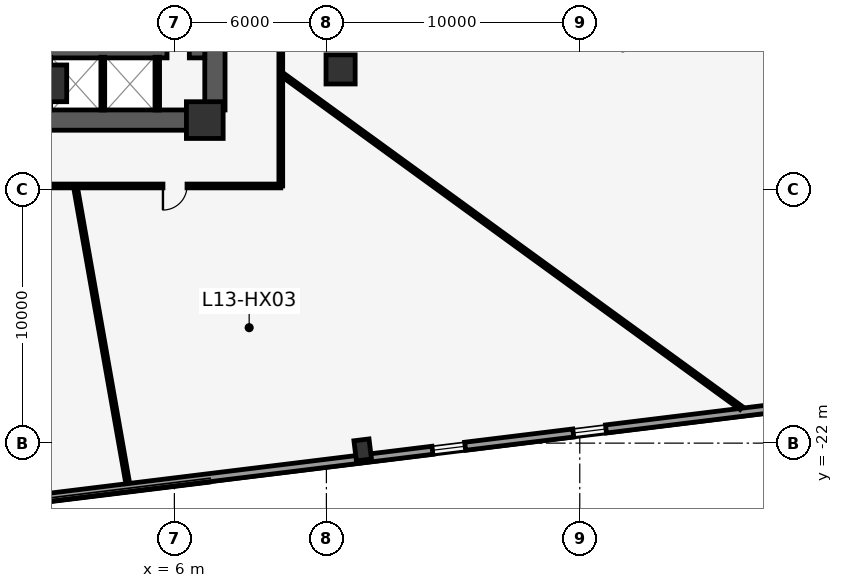
"""IFC4 building model, lengths in metres.
Left out: names, types, materials, properties, quantities, classifications, styles, units other than length and angle.
Written with IfcOpenShell. Run it as: python <this file> out.ifc"""

import sys

from ifc_helpers import new_model, si_unit, direction, frame, frame_2d, origin, origin_2d, place, context, subcontext, project, spatial, rectangle, hollow_rectangle, extrude, element, fill, save


model = new_model("IFC4")
c1 = context("Model", 3, precision=1e-05, world=origin(), true_north=direction((0.0, 1.0)))
c2 = subcontext(c1, "Body", "Model", "MODEL_VIEW")
j1 = project(units=[si_unit("LENGTHUNIT", "METRE"), si_unit("PLANEANGLEUNIT", "RADIAN")], contexts=[c1])
p1 = place(None, origin())
s1 = spatial("IfcSite", under=j1, at=p1, CompositionType="ELEMENT")
p2 = place(p1, origin())
s2 = spatial("IfcBuilding", under=s1, at=p2, CompositionType="ELEMENT")
p3 = place(p2, frame((0.0, 0.0, 62.4)))
s3 = spatial("IfcBuildingStorey", under=s2, at=p3, CompositionType="ELEMENT", Elevation=62.4)
p4 = place(p3, frame((7.6, -8.85, 0.0), z_axis=(0.0, 0.0, 1.0), x_axis=(0.0, 1.0, 0.0)))
e1 = element("IfcWall", 1, at=p4, inside=s3, PredefinedType="SHEAR", context=c2, shape_type="SweptSolid", body=[
    extrude(rectangle(XDim=8.95, YDim=0.8, at=frame_2d((4.475, 0.0))), origin(), (0.0, 0.0, 1.0), 4.35),
])
p5 = place(p4, frame((2.49, 0.0, 0.0)))
e2 = element("IfcOpeningElement", 2, at=p5, cuts=e1, PredefinedType="OPENING", context=c2, shape_type="SweptSolid", body=[
    extrude(rectangle(XDim=1.8, YDim=2.2, at=frame_2d((0.9, 1.1))), frame((0.0, 0.41, 0.0), z_axis=(0.0, -1.0, 0.0), x_axis=(1.0, 0.0, 0.0)), (0.0, 0.0, 1.0), 0.82),
])
p6 = place(p4, frame((7.4, 0.0, 0.0)))
e3 = element("IfcOpeningElement", 3, at=p6, cuts=e1, PredefinedType="OPENING", context=c2, shape_type="SweptSolid", body=[
    extrude(rectangle(XDim=1.2, YDim=2.15, at=frame_2d((0.6, 1.075))), frame((0.0, 0.41, 0.0), z_axis=(0.0, -1.0, 0.0), x_axis=(1.0, 0.0, 0.0)), (0.0, 0.0, 1.0), 0.82),
])
p7 = place(p3, frame((-7.6, -9.25, 0.0), z_axis=(0.0, 0.0, 1.0), x_axis=(1.0, 0.0, 0.0)))
e4 = element("IfcWall", 4, at=p7, inside=s3, PredefinedType="SHEAR", context=c2, shape_type="SweptSolid", body=[
    extrude(rectangle(XDim=15.2, YDim=0.8, at=frame_2d((7.6, 0.0))), origin(), (0.0, 0.0, 1.0), 4.35),
])
p8 = place(p3, frame((-7.2, -6.57, 0.0), z_axis=(0.0, 0.0, 1.0), x_axis=(1.0, 0.0, 0.0)))
e5 = element("IfcWall", 5, at=p8, inside=s3, PredefinedType="SHEAR", context=c2, shape_type="SweptSolid", body=[
    extrude(rectangle(XDim=14.4, YDim=0.45, at=frame_2d((7.2, 0.0))), origin(), (0.0, 0.0, 1.0), 4.35),
])
p9 = place(p8, frame((0.5, 0.0, 0.0)))
e6 = element("IfcOpeningElement", 6, at=p9, cuts=e5, PredefinedType="OPENING", context=c2, shape_type="SweptSolid", body=[
    extrude(rectangle(XDim=1.1, YDim=2.2, at=frame_2d((0.55, 1.1))), frame((0.0, 0.235, 0.0), z_axis=(0.0, -1.0, 0.0), x_axis=(1.0, 0.0, 0.0)), (0.0, 0.0, 1.0), 0.47),
])
p10 = place(p8, frame((2.55, 0.0, 0.0)))
e7 = element("IfcOpeningElement", 7, at=p10, cuts=e5, PredefinedType="OPENING", context=c2, shape_type="SweptSolid", body=[
    extrude(rectangle(XDim=1.1, YDim=2.2, at=frame_2d((0.55, 1.1))), frame((0.0, 0.235, 0.0), z_axis=(0.0, -1.0, 0.0), x_axis=(1.0, 0.0, 0.0)), (0.0, 0.0, 1.0), 0.47),
])
p11 = place(p8, frame((4.6, 0.0, 0.0)))
e8 = element("IfcOpeningElement", 8, at=p11, cuts=e5, PredefinedType="OPENING", context=c2, shape_type="SweptSolid", body=[
    extrude(rectangle(XDim=1.1, YDim=2.2, at=frame_2d((0.55, 1.1))), frame((0.0, 0.235, 0.0), z_axis=(0.0, -1.0, 0.0), x_axis=(1.0, 0.0, 0.0)), (0.0, 0.0, 1.0), 0.47),
])
p12 = place(p8, frame((6.3, 0.0, 0.0)))
e9 = element("IfcOpeningElement", 9, at=p12, cuts=e5, PredefinedType="OPENING", context=c2, shape_type="SweptSolid", body=[
    extrude(rectangle(XDim=1.1, YDim=2.2, at=frame_2d((0.55, 1.1))), frame((0.0, 0.235, 0.0), z_axis=(0.0, -1.0, 0.0), x_axis=(1.0, 0.0, 0.0)), (0.0, 0.0, 1.0), 0.47),
])
p13 = place(p8, frame((12.91, 0.0, 0.0)))
e10 = element("IfcOpeningElement", 10, at=p13, cuts=e5, PredefinedType="OPENING", context=c2, shape_type="SweptSolid", body=[
    extrude(rectangle(XDim=0.88, YDim=2.15, at=frame_2d((0.44, 1.075))), frame((0.0, 0.235, 0.0), z_axis=(0.0, -1.0, 0.0), x_axis=(1.0, 0.0, 0.0)), (0.0, 0.0, 1.0), 0.47),
])
for number, where, z_axis, x_axis in (
    (11, (7.2, -9.25, 0.0), (0.0, 0.0, 1.0), (1.0, 0.0, 0.0)),
    (12, (1.025, -7.8, 0.0), (0.0, 0.0, 1.0), (1.0, 0.0, 0.0)),
):
    element("IfcColumn", number, at=place(p3, frame(where, z_axis=z_axis, x_axis=x_axis)), inside=s3, PredefinedType="COLUMN", context=c2, shape_type="SweptSolid", body=[
        extrude(rectangle(XDim=1.45, YDim=1.45, at=origin_2d()), origin(), (0.0, 0.0, 1.0), 4.6),
    ])
p14 = place(p3, frame((12.56, -7.25, 0.0), z_axis=(0.0, 0.0, 1.0), x_axis=(1.0, 0.0, 0.0)))
e13 = element("IfcColumn", 13, at=p14, inside=s3, PredefinedType="COLUMN", context=c2, shape_type="SweptSolid", body=[
    extrude(rectangle(XDim=1.15, YDim=1.15, at=origin_2d()), origin(), (0.0, 0.0, 1.0), 4.6),
])
p15 = place(p3, frame((13.433, -22.268, 0.0), z_axis=(0.0, 0.0, 1.0), x_axis=(0.992546151641, 0.121869343405, 0.0)))
e14 = element("IfcColumn", 14, at=p15, inside=s3, PredefinedType="COLUMN", context=c2, shape_type="SweptSolid", body=[
    extrude(hollow_rectangle(XDim=0.6, YDim=0.8, WallThickness=0.05, at=origin_2d()), origin(), (0.0, 0.0, 1.0), 4.6),
])
p16 = place(p3, frame((-0.115, 39.555, 0.0), z_axis=(0.0, 0.0, 1.0), x_axis=(0.605877389385, -0.795558036243, 0.0)))
e15 = element("IfcWall", 15, at=p16, inside=s3, PredefinedType="STANDARD", context=c2, shape_type="SweptSolid", body=[
    extrude(rectangle(XDim=64.058, YDim=0.32, at=frame_2d((32.029, 0.0))), origin(), (0.0, 0.0, 1.0), 4.35),
])
p17 = place(p16, frame((6.179, 0.0, 0.85)))
e16 = element("IfcOpeningElement", 16, at=p17, cuts=e15, PredefinedType="OPENING", context=c2, shape_type="SweptSolid", body=[
    extrude(rectangle(XDim=1.3, YDim=2.1, at=frame_2d((0.65, 1.05))), frame((0.0, 0.17, 0.0), z_axis=(0.0, -1.0, 0.0), x_axis=(1.0, 0.0, 0.0)), (0.0, 0.0, 1.0), 0.34),
])
p18 = place(p16, frame((11.779, 0.0, 0.85)))
e17 = element("IfcOpeningElement", 17, at=p18, cuts=e15, PredefinedType="OPENING", context=c2, shape_type="SweptSolid", body=[
    extrude(rectangle(XDim=1.3, YDim=2.1, at=frame_2d((0.65, 1.05))), frame((0.0, 0.17, 0.0), z_axis=(0.0, -1.0, 0.0), x_axis=(1.0, 0.0, 0.0)), (0.0, 0.0, 1.0), 0.34),
])
p19 = place(p16, frame((17.379, 0.0, 0.85)))
e18 = element("IfcOpeningElement", 18, at=p19, cuts=e15, PredefinedType="OPENING", context=c2, shape_type="SweptSolid", body=[
    extrude(rectangle(XDim=1.3, YDim=2.1, at=frame_2d((0.65, 1.05))), frame((0.0, 0.17, 0.0), z_axis=(0.0, -1.0, 0.0), x_axis=(1.0, 0.0, 0.0)), (0.0, 0.0, 1.0), 0.34),
])
p20 = place(p16, frame((50.979, 0.0, 0.85)))
e19 = element("IfcOpeningElement", 19, at=p20, cuts=e15, PredefinedType="OPENING", context=c2, shape_type="SweptSolid", body=[
    extrude(rectangle(XDim=1.3, YDim=2.1, at=frame_2d((0.65, 1.05))), frame((0.0, 0.17, 0.0), z_axis=(0.0, -1.0, 0.0), x_axis=(1.0, 0.0, 0.0)), (0.0, 0.0, 1.0), 0.34),
])
p21 = place(p16, frame((56.579, 0.0, 0.85)))
e20 = element("IfcOpeningElement", 20, at=p21, cuts=e15, PredefinedType="OPENING", context=c2, shape_type="SweptSolid", body=[
    extrude(rectangle(XDim=1.3, YDim=2.1, at=frame_2d((0.65, 1.05))), frame((0.0, 0.17, 0.0), z_axis=(0.0, -1.0, 0.0), x_axis=(1.0, 0.0, 0.0)), (0.0, 0.0, 1.0), 0.34),
])
p22 = place(p3, frame((35.091, -19.961, 0.0), z_axis=(0.0, 0.0, 1.0), x_axis=(-0.992546286146, -0.121868247946, 0.0)))
e21 = element("IfcWall", 21, at=p22, inside=s3, PredefinedType="STANDARD", context=c2, shape_type="SweptSolid", body=[
    extrude(rectangle(XDim=64.793, YDim=0.32, at=frame_2d((32.396, 0.0))), origin(), (0.0, 0.0, 1.0), 4.35),
])
p23 = place(p22, frame((12.147, 0.0, 0.85)))
e22 = element("IfcOpeningElement", 22, at=p23, cuts=e21, PredefinedType="OPENING", context=c2, shape_type="SweptSolid", body=[
    extrude(rectangle(XDim=1.3, YDim=2.1, at=frame_2d((0.65, 1.05))), frame((0.0, 0.17, 0.0), z_axis=(0.0, -1.0, 0.0), x_axis=(1.0, 0.0, 0.0)), (0.0, 0.0, 1.0), 0.34),
])
p24 = place(p22, frame((17.747, 0.0, 0.85)))
e23 = element("IfcOpeningElement", 23, at=p24, cuts=e21, PredefinedType="OPENING", context=c2, shape_type="SweptSolid", body=[
    extrude(rectangle(XDim=1.3, YDim=2.1, at=frame_2d((0.65, 1.05))), frame((0.0, 0.17, 0.0), z_axis=(0.0, -1.0, 0.0), x_axis=(1.0, 0.0, 0.0)), (0.0, 0.0, 1.0), 0.34),
])
p25 = place(p22, frame((45.747, 0.0, 0.85)))
e24 = element("IfcOpeningElement", 24, at=p25, cuts=e21, PredefinedType="OPENING", context=c2, shape_type="SweptSolid", body=[
    extrude(rectangle(XDim=1.3, YDim=2.1, at=frame_2d((0.65, 1.05))), frame((0.0, 0.17, 0.0), z_axis=(0.0, -1.0, 0.0), x_axis=(1.0, 0.0, 0.0)), (0.0, 0.0, 1.0), 0.34),
])
p26 = place(p22, frame((56.947, 0.0, 0.85)))
e25 = element("IfcOpeningElement", 25, at=p26, cuts=e21, PredefinedType="OPENING", context=c2, shape_type="SweptSolid", body=[
    extrude(rectangle(XDim=1.3, YDim=2.1, at=frame_2d((0.65, 1.05))), frame((0.0, 0.17, 0.0), z_axis=(0.0, -1.0, 0.0), x_axis=(1.0, 0.0, 0.0)), (0.0, 0.0, 1.0), 0.34),
])
p27 = place(p3, frame((3.175, -8.85, 0.0), z_axis=(0.0, 0.0, 1.0), x_axis=(0.0, 1.0, 0.0)))
e26 = element("IfcWall", 26, at=p27, inside=s3, PredefinedType="PARTITIONING", context=c2, shape_type="SweptSolid", body=[
    extrude(rectangle(XDim=2.08, YDim=0.15, at=frame_2d((1.04, 0.0))), origin(), (0.0, 0.0, 1.0), 4.35),
])
p28 = place(p3, frame((5.325, -8.85, 0.0), z_axis=(0.0, 0.0, 1.0), x_axis=(0.0, 1.0, 0.0)))
e27 = element("IfcWall", 27, at=p28, inside=s3, PredefinedType="PARTITIONING", context=c2, shape_type="SweptSolid", body=[
    extrude(rectangle(XDim=2.08, YDim=0.18, at=frame_2d((1.04, 0.0))), origin(), (0.0, 0.0, 1.0), 4.35),
])
p29 = place(p3, frame((10.2, 12.15, 0.0), z_axis=(0.0, 0.0, 1.0), x_axis=(0.0, -1.0, 0.0)))
e28 = element("IfcWall", 28, at=p29, inside=s3, PredefinedType="PARTITIONING", context=c2, shape_type="SweptSolid", body=[
    extrude(rectangle(XDim=24.0, YDim=0.15, at=frame_2d((12.0, 0.0))), origin(), (0.0, 0.0, 1.0), 4.35),
])
p30 = place(p29, frame((14.875, 0.0, 0.0)))
e29 = element("IfcOpeningElement", 29, at=p30, cuts=e28, PredefinedType="OPENING", context=c2, shape_type="SweptSolid", body=[
    extrude(rectangle(XDim=0.95, YDim=2.15, at=frame_2d((0.475, 1.075))), frame((0.0, 0.085, 0.0), z_axis=(0.0, -1.0, 0.0), x_axis=(1.0, 0.0, 0.0)), (0.0, 0.0, 1.0), 0.17),
])
p31 = place(p29, frame((6.154, 0.0, 0.0)))
e30 = element("IfcOpeningElement", 30, at=p31, cuts=e28, PredefinedType="OPENING", context=c2, shape_type="SweptSolid", body=[
    extrude(rectangle(XDim=0.95, YDim=2.15, at=frame_2d((0.475, 1.075))), frame((0.0, 0.085, 0.0), z_axis=(0.0, -1.0, 0.0), x_axis=(1.0, 0.0, 0.0)), (0.0, 0.0, 1.0), 0.17),
])
p32 = place(p3, frame((10.2, -11.85, 0.0), z_axis=(0.0, 0.0, 1.0), x_axis=(-1.0, 0.0, 0.0)))
e31 = element("IfcWall", 31, at=p32, inside=s3, PredefinedType="PARTITIONING", context=c2, shape_type="SweptSolid", body=[
    extrude(rectangle(XDim=20.4, YDim=0.15, at=frame_2d((10.2, 0.0))), origin(), (0.0, 0.0, 1.0), 4.35),
])
p33 = place(p32, frame((12.406, 0.0, 0.0)))
e32 = element("IfcOpeningElement", 32, at=p33, cuts=e31, PredefinedType="OPENING", context=c2, shape_type="SweptSolid", body=[
    extrude(rectangle(XDim=0.95, YDim=2.15, at=frame_2d((0.475, 1.075))), frame((0.0, 0.085, 0.0), z_axis=(0.0, -1.0, 0.0), x_axis=(1.0, 0.0, 0.0)), (0.0, 0.0, 1.0), 0.17),
])
p34 = place(p32, frame((3.701, 0.0, 0.0)))
e33 = element("IfcOpeningElement", 33, at=p34, cuts=e31, PredefinedType="OPENING", context=c2, shape_type="SweptSolid", body=[
    extrude(rectangle(XDim=0.95, YDim=2.15, at=frame_2d((0.475, 1.075))), frame((0.0, 0.085, 0.0), z_axis=(0.0, -1.0, 0.0), x_axis=(1.0, 0.0, 0.0)), (0.0, 0.0, 1.0), 0.17),
])
p35 = place(p3, frame((2.108, -11.955, 0.0), z_axis=(0.0, 0.0, 1.0), x_axis=(0.173649679507, -0.984807488196, 0.0)))
e34 = element("IfcWall", 34, at=p35, inside=s3, PredefinedType="PARTITIONING", context=c2, shape_type="SweptSolid", body=[
    extrude(rectangle(XDim=11.807, YDim=0.15, at=frame_2d((5.904, 0.0))), origin(), (0.0, 0.0, 1.0), 4.35),
])
p36 = place(p3, frame((10.305, -7.487, 0.0), z_axis=(0.0, 0.0, 1.0), x_axis=(0.809018288795, -0.587783470671, 0.0)))
e35 = element("IfcWall", 35, at=p36, inside=s3, PredefinedType="PARTITIONING", context=c2, shape_type="SweptSolid", body=[
    extrude(rectangle(XDim=22.327, YDim=0.15, at=frame_2d((11.163, 0.0))), origin(), (0.0, 0.0, 1.0), 4.35),
])
p37 = place(p23, origin())
e36 = element("IfcWindow", 36, at=p37, inside=s3, PartitioningType="SINGLE_PANEL", PredefinedType="WINDOW", context=c2, shape_type="SweptSolid", body=[
    extrude(rectangle(XDim=1.3, YDim=2.1, at=frame_2d((0.65, 1.05))), frame((0.0, 0.03, 0.0), z_axis=(0.0, -1.0, 0.0), x_axis=(1.0, 0.0, 0.0)), (0.0, 0.0, 1.0), 0.06),
])
fill(e22, e36)
p38 = place(p24, origin())
e37 = element("IfcWindow", 37, at=p38, inside=s3, PartitioningType="SINGLE_PANEL", PredefinedType="WINDOW", context=c2, shape_type="SweptSolid", body=[
    extrude(rectangle(XDim=1.3, YDim=2.1, at=frame_2d((0.65, 1.05))), frame((0.0, 0.03, 0.0), z_axis=(0.0, -1.0, 0.0), x_axis=(1.0, 0.0, 0.0)), (0.0, 0.0, 1.0), 0.06),
])
fill(e23, e37)
p39 = place(p13, origin())
e38 = element("IfcDoor", 38, at=p39, inside=s3, OperationType="SINGLE_SWING_LEFT", PredefinedType="DOOR", context=c2, shape_type="SweptSolid", body=[
    extrude(rectangle(XDim=0.88, YDim=2.15, at=frame_2d((0.44, 1.075))), frame((0.0, 0.025, 0.0), z_axis=(0.0, -1.0, 0.0), x_axis=(1.0, 0.0, 0.0)), (0.0, 0.0, 1.0), 0.05),
])
fill(e10, e38)
p40 = place(p34, origin())
e39 = element("IfcDoor", 39, at=p40, inside=s3, OperationType="SINGLE_SWING_RIGHT", PredefinedType="DOOR", context=c2, shape_type="SweptSolid", body=[
    extrude(rectangle(XDim=0.95, YDim=2.15, at=frame_2d((0.475, 1.075))), frame((0.0, 0.025, 0.0), z_axis=(0.0, -1.0, 0.0), x_axis=(1.0, 0.0, 0.0)), (0.0, 0.0, 1.0), 0.05),
])
fill(e33, e39)
save(model, sys.argv[1])
